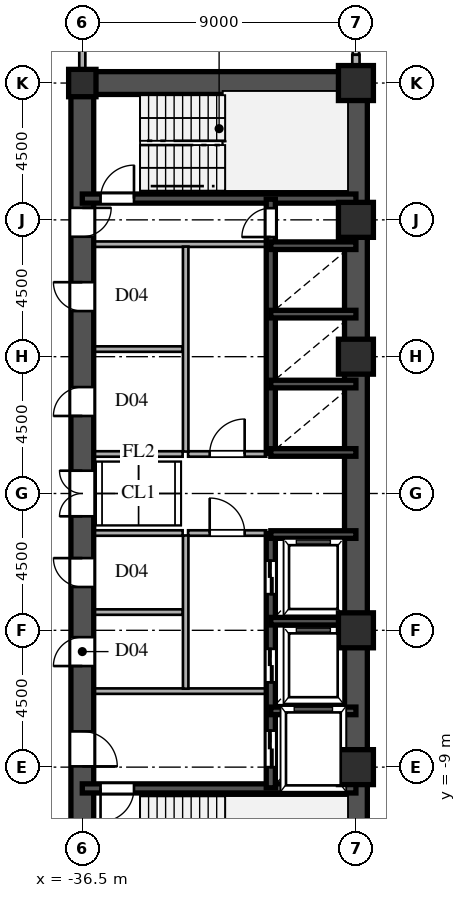
"""IFC4 building model, lengths in metres.
Left out: names, types, materials, properties, quantities, classifications, styles, units other than length and angle.
Written with IfcOpenShell. Run it as: python <this file> out.ifc"""

import sys

from ifc_helpers import new_model, si_unit, direction, frame, frame_2d, origin, origin_2d, place, context, subcontext, project, spatial, rectangle, hollow_rectangle, i_section, extrude, source, transform, mapped, element, fill, save


model = new_model("IFC4")
c1 = context("Model", 3, precision=1e-05, world=origin(), true_north=direction((0.0, 1.0)))
c2 = subcontext(c1, "Body", "Model", "MODEL_VIEW")
j1 = project(units=[si_unit("LENGTHUNIT", "METRE"), si_unit("PLANEANGLEUNIT", "RADIAN")], contexts=[c1])
p1 = place(None, origin())
s1 = spatial("IfcSite", under=j1, at=p1, CompositionType="ELEMENT")
p2 = place(p1, origin())
s2 = spatial("IfcBuilding", under=s1, at=p2, CompositionType="ELEMENT")
p3 = place(p2, frame((0.0, 0.0, 47.7)))
s3 = spatial("IfcBuildingStorey", under=s2, at=p3, CompositionType="ELEMENT", Elevation=47.7)
m1 = source(origin(), c2, "Body", "SweptSolid", [
    extrude(hollow_rectangle(XDim=1.15, YDim=1.15, WallThickness=0.048, at=origin_2d()), origin(), (0.0, 0.0, 1.0), 3.6),
])
for number, where, z_axis, x_axis in (
    (1, (-27.5, -9.0, 0.0), (0.0, 0.0, 1.0), (1.0, 0.0, 0.0)),
    (2, (-27.5, -4.5, 0.0), (0.0, 0.0, 1.0), (1.0, 0.0, 0.0)),
    (3, (-27.5, 4.5, 0.0), (0.0, 0.0, 1.0), (1.0, 0.0, 0.0)),
    (4, (-27.5, 9.0, 0.0), (0.0, 0.0, 1.0), (1.0, 0.0, 0.0)),
    (5, (-27.5, 13.5, 0.0), (0.0, 0.0, 1.0), (1.0, 0.0, 0.0)),
):
    element("IfcColumn", number, at=place(p3, frame(where, z_axis=z_axis, x_axis=x_axis)), inside=s3, PredefinedType="COLUMN", context=c2, shape_type="MappedRepresentation", body=[
        mapped(m1, transform((0.0, 0.0, 0.0), scale=1.0)),
    ])
m2 = source(origin(), c2, "Body", "SweptSolid", [
    extrude(i_section(OverallWidth=0.9, OverallDepth=0.9, WebThickness=0.036, FlangeThickness=0.055, at=origin_2d()), origin(), (0.0, 0.0, 1.0), 3.6),
])
p4 = place(p3, frame((-36.5, 13.5, 0.0), z_axis=(0.0, 0.0, 1.0), x_axis=(1.0, 0.0, 0.0)))
e6 = element("IfcColumn", 6, at=p4, inside=s3, PredefinedType="COLUMN", context=c2, shape_type="MappedRepresentation", body=[
    mapped(m2, transform((0.0, 0.0, 0.0), scale=1.0)),
])
p5 = place(p3, frame((-27.5, 13.88, 0.0), z_axis=(0.0, 0.0, 1.0), x_axis=(0.0, 1.0, 0.0)))
e7 = element("IfcWall", 7, at=p5, inside=s3, PredefinedType="SOLIDWALL", context=c2, shape_type="SweptSolid", body=[
    extrude(rectangle(XDim=0.55, YDim=0.24, at=frame_2d((0.275, 0.0))), origin(), (0.0, 0.0, 1.0), 2.88),
])
for number, where, z_axis, x_axis in (
    (8, (-27.5, -13.5, 0.0), (0.0, 0.0, 1.0), (0.0, 1.0, 0.0)),
    (9, (-27.5, 1.3, 0.0), (0.0, 0.0, 1.0), (0.0, 1.0, 0.0)),
):
    element("IfcWall", number, at=place(p3, frame(where, z_axis=z_axis, x_axis=x_axis)), inside=s3, PredefinedType="SHEAR", context=c2, shape_type="SweptSolid", body=[
        extrude(rectangle(XDim=12.2, YDim=0.75, at=frame_2d((6.1, 0.0))), origin(), (0.0, 0.0, 1.0), 3.38),
    ])
p6 = place(p3, frame((-27.5, -1.3, 0.0), z_axis=(0.0, 0.0, 1.0), x_axis=(0.0, 1.0, 0.0)))
e10 = element("IfcWall", 10, at=p6, inside=s3, PredefinedType="SHEAR", context=c2, shape_type="SweptSolid", body=[
    extrude(rectangle(XDim=2.6, YDim=0.75, at=frame_2d((1.3, 0.0))), origin(), (0.0, 0.0, 1.0), 3.38),
])
p7 = place(p3, frame((-36.5, 13.5, 0.0), z_axis=(0.0, 0.0, 1.0), x_axis=(1.0, 0.0, 0.0)))
e11 = element("IfcWall", 11, at=p7, inside=s3, PredefinedType="SHEAR", context=c2, shape_type="SweptSolid", body=[
    extrude(rectangle(XDim=9.0, YDim=0.75, at=frame_2d((4.5, 0.0))), origin(), (0.0, 0.0, 1.0), 3.38),
])
p8 = place(p3, frame((-36.5, -13.65, 0.0), z_axis=(0.0, 0.0, 1.0), x_axis=(0.0, 1.0, 0.0)))
e12 = element("IfcWall", 12, at=p8, inside=s3, PredefinedType="SHEAR", context=c2, shape_type="SweptSolid", body=[
    extrude(rectangle(XDim=7.15, YDim=0.75, at=frame_2d((3.575, 0.0))), origin(), (0.0, 0.0, 1.0), 3.38),
])
p9 = place(p8, frame((4.675, 0.0, 0.0)))
e13 = element("IfcOpeningElement", 13, at=p9, cuts=e12, PredefinedType="OPENING", context=c2, shape_type="SweptSolid", body=[
    extrude(rectangle(XDim=1.15, YDim=2.2, at=frame_2d((0.575, 1.1))), frame((0.0, 0.385, 0.0), z_axis=(0.0, -1.0, 0.0), x_axis=(1.0, 0.0, 0.0)), (0.0, 0.0, 1.0), 0.77),
])
p10 = place(p3, frame((-36.5, -1.3, 0.0), z_axis=(0.0, 0.0, 1.0), x_axis=(0.0, 1.0, 0.0)))
e14 = element("IfcWall", 14, at=p10, inside=s3, PredefinedType="SHEAR", context=c2, shape_type="SweptSolid", body=[
    extrude(rectangle(XDim=2.6, YDim=0.75, at=frame_2d((1.3, 0.0))), origin(), (0.0, 0.0, 1.0), 3.38),
])
p11 = place(p10, frame((0.55, 0.0, 0.0)))
e15 = element("IfcOpeningElement", 15, at=p11, cuts=e14, PredefinedType="OPENING", context=c2, shape_type="SweptSolid", body=[
    extrude(rectangle(XDim=1.5, YDim=2.3, at=frame_2d((0.75, 1.15))), frame((0.0, 0.385, 0.0), z_axis=(0.0, -1.0, 0.0), x_axis=(1.0, 0.0, 0.0)), (0.0, 0.0, 1.0), 0.77),
])
p12 = place(p3, frame((-36.5, 8.2, 0.0), z_axis=(0.0, 0.0, 1.0), x_axis=(0.0, 1.0, 0.0)))
e16 = element("IfcWall", 16, at=p12, inside=s3, PredefinedType="SHEAR", context=c2, shape_type="SweptSolid", body=[
    extrude(rectangle(XDim=5.45, YDim=0.75, at=frame_2d((2.725, 0.0))), origin(), (0.0, 0.0, 1.0), 3.38),
])
p13 = place(p12, frame((0.245, 0.0, 0.0)))
e17 = element("IfcOpeningElement", 17, at=p13, cuts=e16, PredefinedType="OPENING", context=c2, shape_type="SweptSolid", body=[
    extrude(rectangle(XDim=0.95, YDim=2.15, at=frame_2d((0.475, 1.075))), frame((0.0, 0.385, 0.0), z_axis=(0.0, -1.0, 0.0), x_axis=(1.0, 0.0, 0.0)), (0.0, 0.0, 1.0), 0.77),
])
p14 = place(p3, frame((-36.5, -6.5, 0.0), z_axis=(0.0, 0.0, 1.0), x_axis=(0.0, 1.0, 0.0)))
e18 = element("IfcWall", 18, at=p14, inside=s3, PredefinedType="SHEAR", context=c2, shape_type="SweptSolid", body=[
    extrude(rectangle(XDim=2.6, YDim=0.75, at=frame_2d((1.3, 0.0))), origin(), (0.0, 0.0, 1.0), 3.38),
])
p15 = place(p14, frame((0.825, 0.0, 0.0)))
e19 = element("IfcOpeningElement", 19, at=p15, cuts=e18, PredefinedType="OPENING", context=c2, shape_type="SweptSolid", body=[
    extrude(rectangle(XDim=0.95, YDim=2.15, at=frame_2d((0.475, 1.075))), frame((0.0, 0.385, 0.0), z_axis=(0.0, -1.0, 0.0), x_axis=(1.0, 0.0, 0.0)), (0.0, 0.0, 1.0), 0.77),
])
p16 = place(p3, frame((-36.5, -3.9, 0.0), z_axis=(0.0, 0.0, 1.0), x_axis=(0.0, 1.0, 0.0)))
e20 = element("IfcWall", 20, at=p16, inside=s3, PredefinedType="SHEAR", context=c2, shape_type="SweptSolid", body=[
    extrude(rectangle(XDim=2.6, YDim=0.75, at=frame_2d((1.3, 0.0))), origin(), (0.0, 0.0, 1.0), 3.38),
])
p17 = place(p16, frame((0.825, 0.0, 0.0)))
e21 = element("IfcOpeningElement", 21, at=p17, cuts=e20, PredefinedType="OPENING", context=c2, shape_type="SweptSolid", body=[
    extrude(rectangle(XDim=0.95, YDim=2.15, at=frame_2d((0.475, 1.075))), frame((0.0, 0.385, 0.0), z_axis=(0.0, -1.0, 0.0), x_axis=(1.0, 0.0, 0.0)), (0.0, 0.0, 1.0), 0.77),
])
p18 = place(p3, frame((-36.5, 1.3, 0.0), z_axis=(0.0, 0.0, 1.0), x_axis=(0.0, 1.0, 0.0)))
e22 = element("IfcWall", 22, at=p18, inside=s3, PredefinedType="SHEAR", context=c2, shape_type="SweptSolid", body=[
    extrude(rectangle(XDim=3.45, YDim=0.75, at=frame_2d((1.725, 0.0))), origin(), (0.0, 0.0, 1.0), 3.38),
])
p19 = place(p18, frame((1.25, 0.0, 0.0)))
e23 = element("IfcOpeningElement", 23, at=p19, cuts=e22, PredefinedType="OPENING", context=c2, shape_type="SweptSolid", body=[
    extrude(rectangle(XDim=0.95, YDim=2.15, at=frame_2d((0.475, 1.075))), frame((0.0, 0.385, 0.0), z_axis=(0.0, -1.0, 0.0), x_axis=(1.0, 0.0, 0.0)), (0.0, 0.0, 1.0), 0.77),
])
p20 = place(p3, frame((-36.5, 4.75, 0.0), z_axis=(0.0, 0.0, 1.0), x_axis=(0.0, 1.0, 0.0)))
e24 = element("IfcWall", 24, at=p20, inside=s3, PredefinedType="SHEAR", context=c2, shape_type="SweptSolid", body=[
    extrude(rectangle(XDim=3.45, YDim=0.75, at=frame_2d((1.725, 0.0))), origin(), (0.0, 0.0, 1.0), 3.38),
])
p21 = place(p20, frame((1.25, 0.0, 0.0)))
e25 = element("IfcOpeningElement", 25, at=p21, cuts=e24, PredefinedType="OPENING", context=c2, shape_type="SweptSolid", body=[
    extrude(rectangle(XDim=0.95, YDim=2.15, at=frame_2d((0.475, 1.075))), frame((0.0, 0.385, 0.0), z_axis=(0.0, -1.0, 0.0), x_axis=(1.0, 0.0, 0.0)), (0.0, 0.0, 1.0), 0.77),
])
p22 = place(p3, frame((-36.5, -9.7, 0.0), z_axis=(0.0, 0.0, 1.0), x_axis=(1.0, 0.0, 0.0)))
e26 = element("IfcWall", 26, at=p22, inside=s3, PredefinedType="SHEAR", context=c2, shape_type="SweptSolid", body=[
    extrude(rectangle(XDim=9.0, YDim=0.3, at=frame_2d((4.5, 0.0))), origin(), (0.0, 0.0, 1.0), 3.38),
])
p23 = place(p22, frame((0.6, 0.0, 0.0)))
e27 = element("IfcOpeningElement", 27, at=p23, cuts=e26, PredefinedType="OPENING", context=c2, shape_type="SweptSolid", body=[
    extrude(rectangle(XDim=1.1, YDim=2.2, at=frame_2d((0.55, 1.1))), frame((0.0, 0.16, 0.0), z_axis=(0.0, -1.0, 0.0), x_axis=(1.0, 0.0, 0.0)), (0.0, 0.0, 1.0), 0.32),
])
p24 = place(p3, frame((-36.5, 9.7, 0.0), z_axis=(0.0, 0.0, 1.0), x_axis=(1.0, 0.0, 0.0)))
e28 = element("IfcWall", 28, at=p24, inside=s3, PredefinedType="SHEAR", context=c2, shape_type="SweptSolid", body=[
    extrude(rectangle(XDim=9.0, YDim=0.3, at=frame_2d((4.5, 0.0))), origin(), (0.0, 0.0, 1.0), 3.38),
])
p25 = place(p24, frame((0.6, 0.0, 0.0)))
e29 = element("IfcOpeningElement", 29, at=p25, cuts=e28, PredefinedType="OPENING", context=c2, shape_type="SweptSolid", body=[
    extrude(rectangle(XDim=1.1, YDim=2.2, at=frame_2d((0.55, 1.1))), frame((0.0, 0.16, 0.0), z_axis=(0.0, -1.0, 0.0), x_axis=(1.0, 0.0, 0.0)), (0.0, 0.0, 1.0), 0.32),
])
for number, where, z_axis, x_axis in (
    (30, (-30.3, -7.15, 0.0), (0.0, 0.0, 1.0), (1.0, 0.0, 0.0)),
    (31, (-30.3, -4.2, 0.0), (0.0, 0.0, 1.0), (1.0, 0.0, 0.0)),
    (32, (-30.3, -1.35, 0.0), (0.0, 0.0, 1.0), (1.0, 0.0, 0.0)),
    (33, (-30.3, 1.35, 0.0), (0.0, 0.0, 1.0), (1.0, 0.0, 0.0)),
    (34, (-30.3, 3.6, 0.0), (0.0, 0.0, 1.0), (1.0, 0.0, 0.0)),
    (35, (-30.3, 5.9, 0.0), (0.0, 0.0, 1.0), (1.0, 0.0, 0.0)),
    (36, (-30.3, 8.15, 0.0), (0.0, 0.0, 1.0), (1.0, 0.0, 0.0)),
):
    element("IfcWall", number, at=place(p3, frame(where, z_axis=z_axis, x_axis=x_axis)), inside=s3, PredefinedType="SHEAR", context=c2, shape_type="SweptSolid", body=[
        extrude(rectangle(XDim=2.8, YDim=0.25, at=frame_2d((1.4, 0.0))), origin(), (0.0, 0.0, 1.0), 3.38),
    ])
p26 = place(p3, frame((-30.3, -9.68, 0.0), z_axis=(0.0, 0.0, 1.0), x_axis=(0.0, 1.0, 0.0)))
e37 = element("IfcWall", 37, at=p26, inside=s3, PredefinedType="SHEAR", context=c2, shape_type="SweptSolid", body=[
    extrude(rectangle(XDim=2.56, YDim=0.3, at=frame_2d((1.28, 0.0))), origin(), (0.0, 0.0, 1.0), 3.38),
])
p27 = place(p26, frame((0.68, 0.0, 0.0)))
e38 = element("IfcOpeningElement", 38, at=p27, cuts=e37, PredefinedType="OPENING", context=c2, shape_type="SweptSolid", body=[
    extrude(rectangle(XDim=1.2, YDim=2.25, at=frame_2d((0.6, 1.125))), frame((0.0, 0.16, 0.0), z_axis=(0.0, -1.0, 0.0), x_axis=(1.0, 0.0, 0.0)), (0.0, 0.0, 1.0), 0.32),
])
p28 = place(p3, frame((-30.3, -7.12, 0.0), z_axis=(0.0, 0.0, 1.0), x_axis=(0.0, 1.0, 0.0)))
e39 = element("IfcWall", 39, at=p28, inside=s3, PredefinedType="SHEAR", context=c2, shape_type="SweptSolid", body=[
    extrude(rectangle(XDim=2.92, YDim=0.3, at=frame_2d((1.46, 0.0))), origin(), (0.0, 0.0, 1.0), 3.38),
])
p29 = place(p28, frame((0.91, 0.0, 0.0)))
e40 = element("IfcOpeningElement", 40, at=p29, cuts=e39, PredefinedType="OPENING", context=c2, shape_type="SweptSolid", body=[
    extrude(rectangle(XDim=1.1, YDim=2.2, at=frame_2d((0.55, 1.1))), frame((0.0, 0.16, 0.0), z_axis=(0.0, -1.0, 0.0), x_axis=(1.0, 0.0, 0.0)), (0.0, 0.0, 1.0), 0.32),
])
p30 = place(p3, frame((-30.3, -4.2, 0.0), z_axis=(0.0, 0.0, 1.0), x_axis=(0.0, 1.0, 0.0)))
e41 = element("IfcWall", 41, at=p30, inside=s3, PredefinedType="SHEAR", context=c2, shape_type="SweptSolid", body=[
    extrude(rectangle(XDim=2.88, YDim=0.3, at=frame_2d((1.44, 0.0))), origin(), (0.0, 0.0, 1.0), 3.38),
])
p31 = place(p30, frame((0.89, 0.0, 0.0)))
e42 = element("IfcOpeningElement", 42, at=p31, cuts=e41, PredefinedType="OPENING", context=c2, shape_type="SweptSolid", body=[
    extrude(rectangle(XDim=1.1, YDim=2.2, at=frame_2d((0.55, 1.1))), frame((0.0, 0.16, 0.0), z_axis=(0.0, -1.0, 0.0), x_axis=(1.0, 0.0, 0.0)), (0.0, 0.0, 1.0), 0.32),
])
p32 = place(p3, frame((-30.3, 1.32, 0.0), z_axis=(0.0, 0.0, 1.0), x_axis=(0.0, 1.0, 0.0)))
e43 = element("IfcWall", 43, at=p32, inside=s3, PredefinedType="SHEAR", context=c2, shape_type="SweptSolid", body=[
    extrude(rectangle(XDim=2.28, YDim=0.3, at=frame_2d((1.14, 0.0))), origin(), (0.0, 0.0, 1.0), 3.38),
])
p33 = place(p3, frame((-30.3, 3.6, 0.0), z_axis=(0.0, 0.0, 1.0), x_axis=(0.0, 1.0, 0.0)))
e44 = element("IfcWall", 44, at=p33, inside=s3, PredefinedType="SHEAR", context=c2, shape_type="SweptSolid", body=[
    extrude(rectangle(XDim=2.3, YDim=0.3, at=frame_2d((1.15, 0.0))), origin(), (0.0, 0.0, 1.0), 3.38),
])
p34 = place(p3, frame((-30.3, 5.9, 0.0), z_axis=(0.0, 0.0, 1.0), x_axis=(0.0, 1.0, 0.0)))
e45 = element("IfcWall", 45, at=p34, inside=s3, PredefinedType="SHEAR", context=c2, shape_type="SweptSolid", body=[
    extrude(rectangle(XDim=2.25, YDim=0.3, at=frame_2d((1.125, 0.0))), origin(), (0.0, 0.0, 1.0), 3.38),
])
p35 = place(p3, frame((-30.3, 8.15, 0.0), z_axis=(0.0, 0.0, 1.0), x_axis=(0.0, 1.0, 0.0)))
e46 = element("IfcWall", 46, at=p35, inside=s3, PredefinedType="SHEAR", context=c2, shape_type="SweptSolid", body=[
    extrude(rectangle(XDim=1.53, YDim=0.3, at=frame_2d((0.765, 0.0))), origin(), (0.0, 0.0, 1.0), 3.38),
])
p36 = place(p35, frame((0.285, 0.0, 0.0)))
e47 = element("IfcOpeningElement", 47, at=p36, cuts=e46, PredefinedType="OPENING", context=c2, shape_type="SweptSolid", body=[
    extrude(rectangle(XDim=0.95, YDim=2.15, at=frame_2d((0.475, 1.075))), frame((0.0, 0.16, 0.0), z_axis=(0.0, -1.0, 0.0), x_axis=(1.0, 0.0, 0.0)), (0.0, 0.0, 1.0), 0.32),
])
for number, where, z_axis, x_axis in (
    (48, (-36.15, -6.5, 0.0), (0.0, 0.0, 1.0), (1.0, 0.0, 0.0)),
    (49, (-36.15, 8.2, 0.0), (0.0, 0.0, 1.0), (1.0, 0.0, 0.0)),
):
    element("IfcWall", number, at=place(p3, frame(where, z_axis=z_axis, x_axis=x_axis)), inside=s3, PredefinedType="PARTITIONING", context=c2, shape_type="SweptSolid", body=[
        extrude(rectangle(XDim=5.7, YDim=0.18, at=frame_2d((2.85, 0.0))), origin(), (0.0, 0.0, 1.0), 3.38),
    ])
p37 = place(p3, frame((-33.1, -6.42, 0.0), z_axis=(0.0, 0.0, 1.0), x_axis=(0.0, 1.0, 0.0)))
e50 = element("IfcWall", 50, at=p37, inside=s3, PredefinedType="PARTITIONING", context=c2, shape_type="SweptSolid", body=[
    extrude(rectangle(XDim=5.04, YDim=0.18, at=frame_2d((2.52, 0.0))), origin(), (0.0, 0.0, 1.0), 3.38),
])
p38 = place(p3, frame((-33.1, 1.38, 0.0), z_axis=(0.0, 0.0, 1.0), x_axis=(0.0, 1.0, 0.0)))
e51 = element("IfcWall", 51, at=p38, inside=s3, PredefinedType="PARTITIONING", context=c2, shape_type="SweptSolid", body=[
    extrude(rectangle(XDim=6.74, YDim=0.18, at=frame_2d((3.37, 0.0))), origin(), (0.0, 0.0, 1.0), 3.38),
])
p39 = place(p3, frame((-33.02, -1.3, 0.0), z_axis=(0.0, 0.0, 1.0), x_axis=(1.0, 0.0, 0.0)))
e52 = element("IfcWall", 52, at=p39, inside=s3, PredefinedType="PARTITIONING", context=c2, shape_type="SweptSolid", body=[
    extrude(rectangle(XDim=2.57, YDim=0.18, at=frame_2d((1.285, 0.0))), origin(), (0.0, 0.0, 1.0), 3.38),
])
p40 = place(p39, frame((0.71, 0.0, 0.0)))
e53 = element("IfcOpeningElement", 53, at=p40, cuts=e52, PredefinedType="OPENING", context=c2, shape_type="SweptSolid", body=[
    extrude(rectangle(XDim=1.15, YDim=2.2, at=frame_2d((0.575, 1.1))), frame((0.0, 0.1, 0.0), z_axis=(0.0, -1.0, 0.0), x_axis=(1.0, 0.0, 0.0)), (0.0, 0.0, 1.0), 0.2),
])
p41 = place(p3, frame((-33.02, 1.3, 0.0), z_axis=(0.0, 0.0, 1.0), x_axis=(1.0, 0.0, 0.0)))
e54 = element("IfcWall", 54, at=p41, inside=s3, PredefinedType="PARTITIONING", context=c2, shape_type="SweptSolid", body=[
    extrude(rectangle(XDim=2.57, YDim=0.18, at=frame_2d((1.285, 0.0))), origin(), (0.0, 0.0, 1.0), 3.38),
])
p42 = place(p41, frame((0.71, 0.0, 0.0)))
e55 = element("IfcOpeningElement", 55, at=p42, cuts=e54, PredefinedType="OPENING", context=c2, shape_type="SweptSolid", body=[
    extrude(rectangle(XDim=1.15, YDim=2.2, at=frame_2d((0.575, 1.1))), frame((0.0, 0.1, 0.0), z_axis=(0.0, -1.0, 0.0), x_axis=(1.0, 0.0, 0.0)), (0.0, 0.0, 1.0), 0.2),
])
for number, where, z_axis, x_axis in (
    (56, (-36.15, -1.3, 0.0), (0.0, 0.0, 1.0), (1.0, 0.0, 0.0)),
    (57, (-36.15, 1.3, 0.0), (0.0, 0.0, 1.0), (1.0, 0.0, 0.0)),
    (58, (-36.15, -3.9, 0.0), (0.0, 0.0, 1.0), (1.0, 0.0, 0.0)),
    (59, (-36.15, 4.75, 0.0), (0.0, 0.0, 1.0), (1.0, 0.0, 0.0)),
):
    element("IfcWall", number, at=place(p3, frame(where, z_axis=z_axis, x_axis=x_axis)), inside=s3, PredefinedType="PARTITIONING", context=c2, shape_type="SweptSolid", body=[
        extrude(rectangle(XDim=2.95, YDim=0.18, at=frame_2d((1.475, 0.0))), origin(), (0.0, 0.0, 1.0), 3.38),
    ])
p43 = place(p3, frame((-36.5, 13.88, 0.0), z_axis=(0.0, 0.0, 1.0), x_axis=(0.0, 1.0, 0.0)))
e60 = element("IfcWall", 60, at=p43, inside=s3, PredefinedType="PARTITIONING", context=c2, shape_type="SweptSolid", body=[
    extrude(rectangle(XDim=1.635, YDim=0.2, at=frame_2d((0.817, 0.0))), origin(), (0.0, 0.0, 1.0), 2.68),
])
m3 = source(origin(), c2, "Body", "SweptSolid", [
    extrude(rectangle(XDim=1.15, YDim=2.2, at=frame_2d((0.575, 1.1))), frame((0.0, 0.025, 0.0), z_axis=(0.0, -1.0, 0.0), x_axis=(1.0, 0.0, 0.0)), (0.0, 0.0, 1.0), 0.05),
])
p44 = place(p9, frame((1.15, 0.0, 0.0), z_axis=(0.0, 0.0, 1.0), x_axis=(-1.0, 0.0, 0.0)))
e61 = element("IfcDoor", 61, at=p44, inside=s3, OperationType="SINGLE_SWING_LEFT", PredefinedType="DOOR", context=c2, shape_type="MappedRepresentation", body=[
    mapped(m3, transform((0.0, 0.0, 0.0), scale=1.0)),
])
fill(e13, e61)
m4 = source(origin(), c2, "Body", "SweptSolid", [
    extrude(rectangle(XDim=1.5, YDim=2.3, at=frame_2d((0.75, 1.15))), frame((0.0, 0.025, 0.0), z_axis=(0.0, -1.0, 0.0), x_axis=(1.0, 0.0, 0.0)), (0.0, 0.0, 1.0), 0.05),
])
p45 = place(p11, origin())
e62 = element("IfcDoor", 62, at=p45, inside=s3, OperationType="DOUBLE_SWING_LEFT", PredefinedType="DOOR", context=c2, shape_type="MappedRepresentation", body=[
    mapped(m4, transform((0.0, 0.0, 0.0), scale=1.0)),
])
fill(e15, e62)
m5 = source(origin(), c2, "Body", "SweptSolid", [
    extrude(rectangle(XDim=0.95, YDim=2.15, at=frame_2d((0.475, 1.075))), frame((0.0, 0.025, 0.0), z_axis=(0.0, -1.0, 0.0), x_axis=(1.0, 0.0, 0.0)), (0.0, 0.0, 1.0), 0.05),
])
p46 = place(p13, frame((0.95, 0.0, 0.0), z_axis=(0.0, 0.0, 1.0), x_axis=(-1.0, 0.0, 0.0)))
e63 = element("IfcDoor", 63, at=p46, inside=s3, OperationType="SINGLE_SWING_RIGHT", PredefinedType="DOOR", context=c2, shape_type="MappedRepresentation", body=[
    mapped(m5, transform((0.0, 0.0, 0.0), scale=1.0)),
])
fill(e17, e63)
p47 = place(p15, origin())
e64 = element("IfcDoor", 64, at=p47, inside=s3, OperationType="SINGLE_SWING_LEFT", PredefinedType="DOOR", context=c2, shape_type="MappedRepresentation", body=[
    mapped(m5, transform((0.0, 0.0, 0.0), scale=1.0)),
])
fill(e19, e64)
p48 = place(p17, origin())
e65 = element("IfcDoor", 65, at=p48, inside=s3, OperationType="SINGLE_SWING_RIGHT", PredefinedType="DOOR", context=c2, shape_type="MappedRepresentation", body=[
    mapped(m5, transform((0.0, 0.0, 0.0), scale=1.0)),
])
fill(e21, e65)
p49 = place(p19, origin())
e66 = element("IfcDoor", 66, at=p49, inside=s3, OperationType="SINGLE_SWING_LEFT", PredefinedType="DOOR", context=c2, shape_type="MappedRepresentation", body=[
    mapped(m5, transform((0.0, 0.0, 0.0), scale=1.0)),
])
fill(e23, e66)
p50 = place(p21, origin())
e67 = element("IfcDoor", 67, at=p50, inside=s3, OperationType="SINGLE_SWING_RIGHT", PredefinedType="DOOR", context=c2, shape_type="MappedRepresentation", body=[
    mapped(m5, transform((0.0, 0.0, 0.0), scale=1.0)),
])
fill(e25, e67)
m6 = source(origin(), c2, "Body", "SweptSolid", [
    extrude(rectangle(XDim=1.1, YDim=2.2, at=frame_2d((0.55, 1.1))), frame((0.0, 0.025, 0.0), z_axis=(0.0, -1.0, 0.0), x_axis=(1.0, 0.0, 0.0)), (0.0, 0.0, 1.0), 0.05),
])
p51 = place(p23, frame((1.1, 0.0, 0.0), z_axis=(0.0, 0.0, 1.0), x_axis=(-1.0, 0.0, 0.0)))
e68 = element("IfcDoor", 68, at=p51, inside=s3, OperationType="SINGLE_SWING_LEFT", PredefinedType="DOOR", context=c2, shape_type="MappedRepresentation", body=[
    mapped(m6, transform((0.0, 0.0, 0.0), scale=1.0)),
])
fill(e27, e68)
p52 = place(p25, origin())
e69 = element("IfcDoor", 69, at=p52, inside=s3, OperationType="SINGLE_SWING_RIGHT", PredefinedType="DOOR", context=c2, shape_type="MappedRepresentation", body=[
    mapped(m6, transform((0.0, 0.0, 0.0), scale=1.0)),
])
fill(e29, e69)
m7 = source(origin(), c2, "Body", "SweptSolid", [
    extrude(rectangle(XDim=1.2, YDim=2.25, at=frame_2d((0.6, 1.125))), frame((0.0, 0.025, 0.0), z_axis=(0.0, -1.0, 0.0), x_axis=(1.0, 0.0, 0.0)), (0.0, 0.0, 1.0), 0.05),
])
p53 = place(p27, origin())
e70 = element("IfcDoor", 70, at=p53, inside=s3, OperationType="DOUBLE_DOOR_SLIDING", PredefinedType="DOOR", context=c2, shape_type="MappedRepresentation", body=[
    mapped(m7, transform((0.0, 0.0, 0.0), scale=1.0)),
])
fill(e38, e70)
m8 = source(origin(), c2, "Body", "SweptSolid", [
    extrude(rectangle(XDim=1.1, YDim=2.2, at=frame_2d((0.55, 1.1))), frame((0.0, 0.025, 0.0), z_axis=(0.0, -1.0, 0.0), x_axis=(1.0, 0.0, 0.0)), (0.0, 0.0, 1.0), 0.05),
])
p54 = place(p29, origin())
e71 = element("IfcDoor", 71, at=p54, inside=s3, OperationType="DOUBLE_DOOR_SLIDING", PredefinedType="DOOR", context=c2, shape_type="MappedRepresentation", body=[
    mapped(m8, transform((0.0, 0.0, 0.0), scale=1.0)),
])
fill(e40, e71)
p55 = place(p31, origin())
e72 = element("IfcDoor", 72, at=p55, inside=s3, OperationType="DOUBLE_DOOR_SLIDING", PredefinedType="DOOR", context=c2, shape_type="MappedRepresentation", body=[
    mapped(m8, transform((0.0, 0.0, 0.0), scale=1.0)),
])
fill(e42, e72)
p56 = place(p36, origin())
e73 = element("IfcDoor", 73, at=p56, inside=s3, OperationType="SINGLE_SWING_LEFT", PredefinedType="DOOR", context=c2, shape_type="MappedRepresentation", body=[
    mapped(m5, transform((0.0, 0.0, 0.0), scale=1.0)),
])
fill(e47, e73)
p57 = place(p40, origin())
e74 = element("IfcDoor", 74, at=p57, inside=s3, OperationType="SINGLE_SWING_LEFT", PredefinedType="DOOR", context=c2, shape_type="MappedRepresentation", body=[
    mapped(m3, transform((0.0, 0.0, 0.0), scale=1.0)),
])
fill(e53, e74)
p58 = place(p42, origin())
e75 = element("IfcDoor", 75, at=p58, inside=s3, OperationType="SINGLE_SWING_RIGHT", PredefinedType="DOOR", context=c2, shape_type="MappedRepresentation", body=[
    mapped(m3, transform((0.0, 0.0, 0.0), scale=1.0)),
])
fill(e55, e75)
save(model, sys.argv[1])
